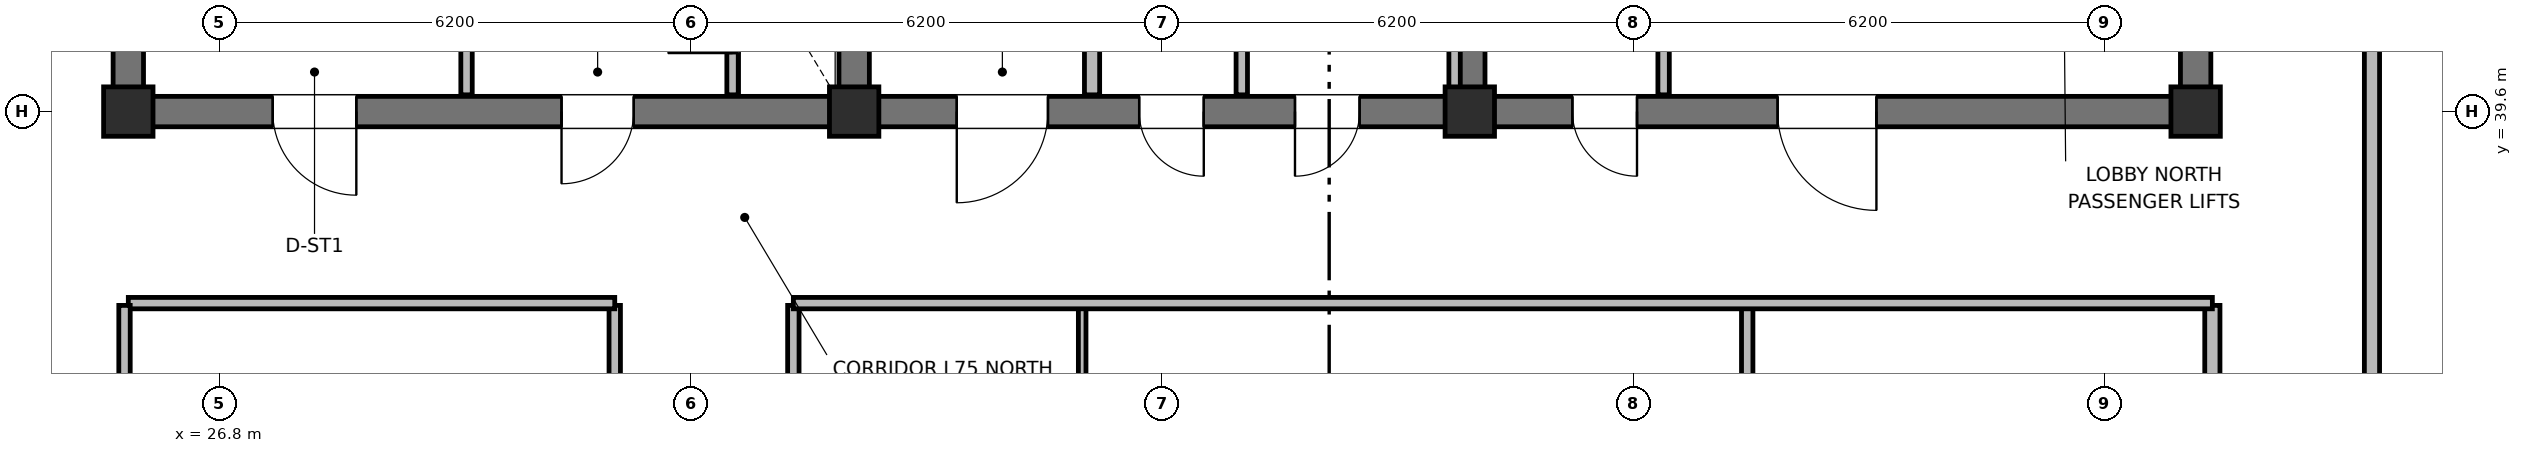
"""IFC4 building model, lengths in metres.
Left out: names, types, materials, properties, quantities, classifications, styles, units other than length and angle.
Written with IfcOpenShell. Run it as: python <this file> out.ifc"""

import sys

from ifc_helpers import new_model, si_unit, direction, frame, frame_2d, origin, origin_2d, place, context, subcontext, project, spatial, rectangle, extrude, element, fill, save


model = new_model("IFC4")
c1 = context("Model", 3, precision=1e-05, world=origin(), true_north=direction((0.0, 1.0)))
c2 = subcontext(c1, "Body", "Model", "MODEL_VIEW")
j1 = project(units=[si_unit("LENGTHUNIT", "METRE"), si_unit("PLANEANGLEUNIT", "RADIAN")], contexts=[c1])
p1 = place(None, origin())
s1 = spatial("IfcSite", under=j1, at=p1, CompositionType="ELEMENT")
p2 = place(p1, origin())
s2 = spatial("IfcBuilding", under=s1, at=p2, CompositionType="ELEMENT")
p3 = place(p2, frame((0.0, 0.0, 297.2)))
s3 = spatial("IfcBuildingStorey", under=s2, at=p3, CompositionType="ELEMENT", Elevation=297.2)
for number, where, z_axis, x_axis in (
    (1, (25.6, 39.8, 0.0), (0.0, 0.0, 1.0), (0.0, 1.0, 0.0)),
    (2, (52.8, 39.8, 0.0), (0.0, 0.0, 1.0), (0.0, 1.0, 0.0)),
):
    element("IfcWall", number, at=place(p3, frame(where, z_axis=z_axis, x_axis=x_axis)), inside=s3, PredefinedType="SHEAR", context=c2, shape_type="SweptSolid", body=[
        extrude(rectangle(XDim=5.8, YDim=0.4, at=frame_2d((2.9, 0.0))), origin(), (0.0, 0.0, 1.0), 4.8),
    ])
p4 = place(p3, frame((52.8, 39.6, 0.0), z_axis=(0.0, 0.0, 1.0), x_axis=(-1.0, 0.0, 0.0)))
e3 = element("IfcWall", 3, at=p4, inside=s3, PredefinedType="SHEAR", context=c2, shape_type="SweptSolid", body=[
    extrude(rectangle(XDim=27.2, YDim=0.4, at=frame_2d((13.6, 0.0))), origin(), (0.0, 0.0, 1.0), 4.8),
])
p5 = place(p4, frame((24.2, 0.0, 0.0)))
e4 = element("IfcOpeningElement", 4, at=p5, cuts=e3, PredefinedType="OPENING", context=c2, shape_type="SweptSolid", body=[
    extrude(rectangle(XDim=1.1, YDim=2.15, at=frame_2d((0.55, 1.075))), frame((0.0, 0.21, 0.0), z_axis=(0.0, -1.0, 0.0), x_axis=(1.0, 0.0, 0.0)), (0.0, 0.0, 1.0), 0.42),
])
p6 = place(p4, frame((20.55, 0.0, 0.0)))
e5 = element("IfcOpeningElement", 5, at=p6, cuts=e3, PredefinedType="OPENING", context=c2, shape_type="SweptSolid", body=[
    extrude(rectangle(XDim=0.95, YDim=2.1, at=frame_2d((0.475, 1.05))), frame((0.0, 0.21, 0.0), z_axis=(0.0, -1.0, 0.0), x_axis=(1.0, 0.0, 0.0)), (0.0, 0.0, 1.0), 0.42),
])
p7 = place(p4, frame((15.1, 0.0, 0.0)))
e6 = element("IfcOpeningElement", 6, at=p7, cuts=e3, PredefinedType="OPENING", context=c2, shape_type="SweptSolid", body=[
    extrude(rectangle(XDim=1.2, YDim=2.15, at=frame_2d((0.6, 1.075))), frame((0.0, 0.21, 0.0), z_axis=(0.0, -1.0, 0.0), x_axis=(1.0, 0.0, 0.0)), (0.0, 0.0, 1.0), 0.42),
])
p8 = place(p4, frame((13.05, 0.0, 0.0)))
e7 = element("IfcOpeningElement", 7, at=p8, cuts=e3, PredefinedType="OPENING", context=c2, shape_type="SweptSolid", body=[
    extrude(rectangle(XDim=0.85, YDim=2.1, at=frame_2d((0.425, 1.05))), frame((0.0, 0.21, 0.0), z_axis=(0.0, -1.0, 0.0), x_axis=(1.0, 0.0, 0.0)), (0.0, 0.0, 1.0), 0.42),
])
p9 = place(p4, frame((11.0, 0.0, 0.0)))
e8 = element("IfcOpeningElement", 8, at=p9, cuts=e3, PredefinedType="OPENING", context=c2, shape_type="SweptSolid", body=[
    extrude(rectangle(XDim=0.85, YDim=2.1, at=frame_2d((0.425, 1.05))), frame((0.0, 0.21, 0.0), z_axis=(0.0, -1.0, 0.0), x_axis=(1.0, 0.0, 0.0)), (0.0, 0.0, 1.0), 0.42),
])
p10 = place(p4, frame((7.35, 0.0, 0.0)))
e9 = element("IfcOpeningElement", 9, at=p10, cuts=e3, PredefinedType="OPENING", context=c2, shape_type="SweptSolid", body=[
    extrude(rectangle(XDim=0.85, YDim=2.1, at=frame_2d((0.425, 1.05))), frame((0.0, 0.21, 0.0), z_axis=(0.0, -1.0, 0.0), x_axis=(1.0, 0.0, 0.0)), (0.0, 0.0, 1.0), 0.42),
])
p11 = place(p4, frame((4.2, 0.0, 0.0)))
e10 = element("IfcOpeningElement", 10, at=p11, cuts=e3, PredefinedType="OPENING", context=c2, shape_type="SweptSolid", body=[
    extrude(rectangle(XDim=1.3, YDim=2.2, at=frame_2d((0.65, 1.1))), frame((0.0, 0.21, 0.0), z_axis=(0.0, -1.0, 0.0), x_axis=(1.0, 0.0, 0.0)), (0.0, 0.0, 1.0), 0.42),
])
for number, where, z_axis, x_axis in (
    (11, (35.15, 39.8, 0.0), (0.0, 0.0, 1.0), (0.0, 1.0, 0.0)),
    (12, (43.25, 39.8, 0.0), (0.0, 0.0, 1.0), (0.0, 1.0, 0.0)),
):
    element("IfcWall", number, at=place(p3, frame(where, z_axis=z_axis, x_axis=x_axis)), inside=s3, PredefinedType="SHEAR", context=c2, shape_type="SweptSolid", body=[
        extrude(rectangle(XDim=5.8, YDim=0.4, at=frame_2d((2.9, 0.0))), origin(), (0.0, 0.0, 1.0), 4.8),
    ])
for number, where, z_axis, x_axis in (
    (13, (25.6, 39.6, 0.0), (0.0, 0.0, 1.0), (1.0, 0.0, 0.0)),
    (14, (35.15, 39.6, 0.0), (0.0, 0.0, 1.0), (1.0, 0.0, 0.0)),
    (15, (43.25, 39.6, 0.0), (0.0, 0.0, 1.0), (1.0, 0.0, 0.0)),
    (16, (52.8, 39.6, 0.0), (0.0, 0.0, 1.0), (1.0, 0.0, 0.0)),
):
    element("IfcColumn", number, at=place(p3, frame(where, z_axis=z_axis, x_axis=x_axis)), inside=s3, PredefinedType="COLUMN", context=c2, shape_type="SweptSolid", body=[
        extrude(rectangle(XDim=0.65, YDim=0.65, at=origin_2d()), origin(), (0.0, 0.0, 1.0), 4.8),
    ])
p12 = place(p3, frame((33.55, 39.82, 0.0), z_axis=(0.0, 0.0, 1.0), x_axis=(0.0, 1.0, 0.0)))
e17 = element("IfcWall", 17, at=p12, inside=s3, PredefinedType="PARTITIONING", context=c2, shape_type="SweptSolid", body=[
    extrude(rectangle(XDim=2.13, YDim=0.15, at=frame_2d((1.065, 0.0))), origin(), (0.0, 0.0, 1.0), 2.56),
])
p13 = place(p12, frame((0.55, 0.0, 0.0)))
e18 = element("IfcOpeningElement", 18, at=p13, cuts=e17, PredefinedType="OPENING", context=c2, shape_type="SweptSolid", body=[
    extrude(rectangle(XDim=0.85, YDim=2.05, at=frame_2d((0.425, 1.025))), frame((0.0, 0.085, 0.0), z_axis=(0.0, -1.0, 0.0), x_axis=(1.0, 0.0, 0.0)), (0.0, 0.0, 1.0), 0.17),
])
p14 = place(p3, frame((30.05, 39.82, 0.0), z_axis=(0.0, 0.0, 1.0), x_axis=(0.0, 1.0, 0.0)))
e19 = element("IfcWall", 19, at=p14, inside=s3, PredefinedType="PARTITIONING", context=c2, shape_type="SweptSolid", body=[
    extrude(rectangle(XDim=2.13, YDim=0.15, at=frame_2d((1.065, 0.0))), origin(), (0.0, 0.0, 1.0), 2.56),
])
p15 = place(p3, frame((38.28, 39.82, 0.0), z_axis=(0.0, 0.0, 1.0), x_axis=(0.0, 1.0, 0.0)))
e20 = element("IfcWall", 20, at=p15, inside=s3, PredefinedType="PARTITIONING", context=c2, shape_type="SweptSolid", body=[
    extrude(rectangle(XDim=5.63, YDim=0.2, at=frame_2d((2.815, 0.0))), origin(), (0.0, 0.0, 1.0), 2.56),
])
for number, where, z_axis, x_axis in (
    (21, (43.05, 39.82, 0.0), (0.0, 0.0, 1.0), (0.0, 1.0, 0.0)),
    (22, (40.25, 39.82, 0.0), (0.0, 0.0, 1.0), (0.0, 1.0, 0.0)),
    (23, (45.8, 39.82, 0.0), (0.0, 0.0, 1.0), (0.0, 1.0, 0.0)),
):
    element("IfcWall", number, at=place(p3, frame(where, z_axis=z_axis, x_axis=x_axis)), inside=s3, PredefinedType="PARTITIONING", context=c2, shape_type="SweptSolid", body=[
        extrude(rectangle(XDim=5.63, YDim=0.15, at=frame_2d((2.815, 0.0))), origin(), (0.0, 0.0, 1.0), 2.56),
    ])
p16 = place(p3, frame((32.0, 19.35, 0.0), z_axis=(0.0, 0.0, 1.0), x_axis=(0.0, 1.0, 0.0)))
e24 = element("IfcWall", 24, at=p16, inside=s3, PredefinedType="PARTITIONING", context=c2, shape_type="SweptSolid", body=[
    extrude(rectangle(XDim=17.7, YDim=0.15, at=frame_2d((8.85, 0.0))), origin(), (0.0, 0.0, 1.0), 2.56),
])
p17 = place(p16, frame((3.0, 0.0, 0.0)))
e25 = element("IfcOpeningElement", 25, at=p17, cuts=e24, PredefinedType="OPENING", context=c2, shape_type="SweptSolid", body=[
    extrude(rectangle(XDim=1.3, YDim=2.2, at=frame_2d((0.65, 1.1))), frame((0.0, 0.085, 0.0), z_axis=(0.0, -1.0, 0.0), x_axis=(1.0, 0.0, 0.0)), (0.0, 0.0, 1.0), 0.17),
])
p18 = place(p16, frame((13.0, 0.0, 0.0)))
e26 = element("IfcOpeningElement", 26, at=p18, cuts=e24, PredefinedType="OPENING", context=c2, shape_type="SweptSolid", body=[
    extrude(rectangle(XDim=1.3, YDim=2.2, at=frame_2d((0.65, 1.1))), frame((0.0, 0.085, 0.0), z_axis=(0.0, -1.0, 0.0), x_axis=(1.0, 0.0, 0.0)), (0.0, 0.0, 1.0), 0.17),
])
p19 = place(p3, frame((25.6, 37.08, 0.0), z_axis=(0.0, 0.0, 1.0), x_axis=(1.0, 0.0, 0.0)))
e27 = element("IfcWall", 27, at=p19, inside=s3, PredefinedType="PARTITIONING", context=c2, shape_type="SweptSolid", body=[
    extrude(rectangle(XDim=6.4, YDim=0.15, at=frame_2d((3.2, 0.0))), origin(), (0.0, 0.0, 1.0), 2.56),
])
p20 = place(p3, frame((25.55, 19.35, 0.0), z_axis=(0.0, 0.0, 1.0), x_axis=(0.0, 1.0, 0.0)))
e28 = element("IfcWall", 28, at=p20, inside=s3, PredefinedType="PARTITIONING", context=c2, shape_type="SweptSolid", body=[
    extrude(rectangle(XDim=17.7, YDim=0.15, at=frame_2d((8.85, 0.0))), origin(), (0.0, 0.0, 1.0), 2.56),
])
p21 = place(p20, frame((5.5, 0.0, 0.0)))
e29 = element("IfcOpeningElement", 29, at=p21, cuts=e28, PredefinedType="OPENING", context=c2, shape_type="SweptSolid", body=[
    extrude(rectangle(XDim=1.3, YDim=2.2, at=frame_2d((0.65, 1.1))), frame((0.0, 0.085, 0.0), z_axis=(0.0, -1.0, 0.0), x_axis=(1.0, 0.0, 0.0)), (0.0, 0.0, 1.0), 0.17),
])
p22 = place(p3, frame((34.35, 19.35, 0.0), z_axis=(0.0, 0.0, 1.0), x_axis=(0.0, 1.0, 0.0)))
e30 = element("IfcWall", 30, at=p22, inside=s3, PredefinedType="PARTITIONING", context=c2, shape_type="SweptSolid", body=[
    extrude(rectangle(XDim=17.7, YDim=0.15, at=frame_2d((8.85, 0.0))), origin(), (0.0, 0.0, 1.0), 2.56),
])
p23 = place(p22, frame((4.0, 0.0, 0.0)))
e31 = element("IfcOpeningElement", 31, at=p23, cuts=e30, PredefinedType="OPENING", context=c2, shape_type="SweptSolid", body=[
    extrude(rectangle(XDim=1.3, YDim=2.2, at=frame_2d((0.65, 1.1))), frame((0.0, 0.085, 0.0), z_axis=(0.0, -1.0, 0.0), x_axis=(1.0, 0.0, 0.0)), (0.0, 0.0, 1.0), 0.17),
])
p24 = place(p22, frame((13.6, 0.0, 0.0)))
e32 = element("IfcOpeningElement", 32, at=p24, cuts=e30, PredefinedType="OPENING", context=c2, shape_type="SweptSolid", body=[
    extrude(rectangle(XDim=0.95, YDim=2.1, at=frame_2d((0.475, 1.05))), frame((0.0, 0.085, 0.0), z_axis=(0.0, -1.0, 0.0), x_axis=(1.0, 0.0, 0.0)), (0.0, 0.0, 1.0), 0.17),
])
p25 = place(p3, frame((38.15, 30.95, 0.0), z_axis=(0.0, 0.0, 1.0), x_axis=(0.0, 1.0, 0.0)))
e33 = element("IfcWall", 33, at=p25, inside=s3, PredefinedType="PARTITIONING", context=c2, shape_type="SweptSolid", body=[
    extrude(rectangle(XDim=6.07, YDim=0.1, at=frame_2d((3.035, 0.0))), origin(), (0.0, 0.0, 1.0), 2.56),
])
p26 = place(p3, frame((46.9, 19.35, 0.0), z_axis=(0.0, 0.0, 1.0), x_axis=(0.0, 1.0, 0.0)))
e34 = element("IfcWall", 34, at=p26, inside=s3, PredefinedType="PARTITIONING", context=c2, shape_type="SweptSolid", body=[
    extrude(rectangle(XDim=17.7, YDim=0.15, at=frame_2d((8.85, 0.0))), origin(), (0.0, 0.0, 1.0), 2.56),
])
p27 = place(p3, frame((53.02, 19.35, 0.0), z_axis=(0.0, 0.0, 1.0), x_axis=(0.0, 1.0, 0.0)))
e35 = element("IfcWall", 35, at=p27, inside=s3, PredefinedType="PARTITIONING", context=c2, shape_type="SweptSolid", body=[
    extrude(rectangle(XDim=17.7, YDim=0.2, at=frame_2d((8.85, 0.0))), origin(), (0.0, 0.0, 1.0), 2.56),
])
p28 = place(p27, frame((6.5, 0.0, 0.0)))
e36 = element("IfcOpeningElement", 36, at=p28, cuts=e35, PredefinedType="OPENING", context=c2, shape_type="SweptSolid", body=[
    extrude(rectangle(XDim=1.0, YDim=2.15, at=frame_2d((0.5, 1.075))), frame((0.0, 0.11, 0.0), z_axis=(0.0, -1.0, 0.0), x_axis=(1.0, 0.0, 0.0)), (0.0, 0.0, 1.0), 0.22),
])
p29 = place(p3, frame((34.35, 37.08, 0.0), z_axis=(0.0, 0.0, 1.0), x_axis=(1.0, 0.0, 0.0)))
e37 = element("IfcWall", 37, at=p29, inside=s3, PredefinedType="PARTITIONING", context=c2, shape_type="SweptSolid", body=[
    extrude(rectangle(XDim=18.67, YDim=0.15, at=frame_2d((9.335, 0.0))), origin(), (0.0, 0.0, 1.0), 2.56),
])
p30 = place(p3, frame((55.12, 10.5, 0.0), z_axis=(0.0, 0.0, 1.0), x_axis=(0.0, 1.0, 0.0)))
e38 = element("IfcWall", 38, at=p30, inside=s3, PredefinedType="PARTITIONING", context=c2, shape_type="SweptSolid", body=[
    extrude(rectangle(XDim=35.4, YDim=0.2, at=frame_2d((17.7, 0.0))), origin(), (0.0, 0.0, 1.0), 2.56),
])
p31 = place(p30, frame((2.75, 0.0, 0.0)))
e39 = element("IfcOpeningElement", 39, at=p31, cuts=e38, PredefinedType="OPENING", context=c2, shape_type="SweptSolid", body=[
    extrude(rectangle(XDim=1.0, YDim=2.15, at=frame_2d((0.5, 1.075))), frame((0.0, 0.11, 0.0), z_axis=(0.0, -1.0, 0.0), x_axis=(1.0, 0.0, 0.0)), (0.0, 0.0, 1.0), 0.22),
])
p32 = place(p13, origin())
e40 = element("IfcDoor", 40, at=p32, inside=s3, OperationType="SINGLE_SWING_LEFT", PredefinedType="TRAPDOOR", context=c2, shape_type="SweptSolid", body=[
    extrude(rectangle(XDim=0.85, YDim=2.05, at=frame_2d((0.425, 1.025))), frame((0.0, 0.025, 0.0), z_axis=(0.0, -1.0, 0.0), x_axis=(1.0, 0.0, 0.0)), (0.0, 0.0, 1.0), 0.05),
])
fill(e18, e40)
p33 = place(p5, origin())
e41 = element("IfcDoor", 41, at=p33, inside=s3, OperationType="SINGLE_SWING_LEFT", PredefinedType="DOOR", context=c2, shape_type="SweptSolid", body=[
    extrude(rectangle(XDim=1.1, YDim=2.15, at=frame_2d((0.55, 1.075))), frame((0.0, 0.025, 0.0), z_axis=(0.0, -1.0, 0.0), x_axis=(1.0, 0.0, 0.0)), (0.0, 0.0, 1.0), 0.05),
])
fill(e4, e41)
p34 = place(p6, origin())
e42 = element("IfcDoor", 42, at=p34, inside=s3, OperationType="SINGLE_SWING_RIGHT", PredefinedType="DOOR", context=c2, shape_type="SweptSolid", body=[
    extrude(rectangle(XDim=0.95, YDim=2.1, at=frame_2d((0.475, 1.05))), frame((0.0, 0.025, 0.0), z_axis=(0.0, -1.0, 0.0), x_axis=(1.0, 0.0, 0.0)), (0.0, 0.0, 1.0), 0.05),
])
fill(e5, e42)
p35 = place(p7, origin())
e43 = element("IfcDoor", 43, at=p35, inside=s3, OperationType="SINGLE_SWING_RIGHT", PredefinedType="DOOR", context=c2, shape_type="SweptSolid", body=[
    extrude(rectangle(XDim=1.2, YDim=2.15, at=frame_2d((0.6, 1.075))), frame((0.0, 0.025, 0.0), z_axis=(0.0, -1.0, 0.0), x_axis=(1.0, 0.0, 0.0)), (0.0, 0.0, 1.0), 0.05),
])
fill(e6, e43)
p36 = place(p8, origin())
e44 = element("IfcDoor", 44, at=p36, inside=s3, OperationType="SINGLE_SWING_LEFT", PredefinedType="DOOR", context=c2, shape_type="SweptSolid", body=[
    extrude(rectangle(XDim=0.85, YDim=2.1, at=frame_2d((0.425, 1.05))), frame((0.0, 0.025, 0.0), z_axis=(0.0, -1.0, 0.0), x_axis=(1.0, 0.0, 0.0)), (0.0, 0.0, 1.0), 0.05),
])
fill(e7, e44)
p37 = place(p9, origin())
e45 = element("IfcDoor", 45, at=p37, inside=s3, OperationType="SINGLE_SWING_RIGHT", PredefinedType="DOOR", context=c2, shape_type="SweptSolid", body=[
    extrude(rectangle(XDim=0.85, YDim=2.1, at=frame_2d((0.425, 1.05))), frame((0.0, 0.025, 0.0), z_axis=(0.0, -1.0, 0.0), x_axis=(1.0, 0.0, 0.0)), (0.0, 0.0, 1.0), 0.05),
])
fill(e8, e45)
p38 = place(p10, origin())
e46 = element("IfcDoor", 46, at=p38, inside=s3, OperationType="SINGLE_SWING_LEFT", PredefinedType="DOOR", context=c2, shape_type="SweptSolid", body=[
    extrude(rectangle(XDim=0.85, YDim=2.1, at=frame_2d((0.425, 1.05))), frame((0.0, 0.025, 0.0), z_axis=(0.0, -1.0, 0.0), x_axis=(1.0, 0.0, 0.0)), (0.0, 0.0, 1.0), 0.05),
])
fill(e9, e46)
p39 = place(p11, origin())
e47 = element("IfcDoor", 47, at=p39, inside=s3, OperationType="SINGLE_SWING_LEFT", PredefinedType="DOOR", context=c2, shape_type="SweptSolid", body=[
    extrude(rectangle(XDim=1.3, YDim=2.2, at=frame_2d((0.65, 1.1))), frame((0.0, 0.025, 0.0), z_axis=(0.0, -1.0, 0.0), x_axis=(1.0, 0.0, 0.0)), (0.0, 0.0, 1.0), 0.05),
])
fill(e10, e47)
save(model, sys.argv[1])
